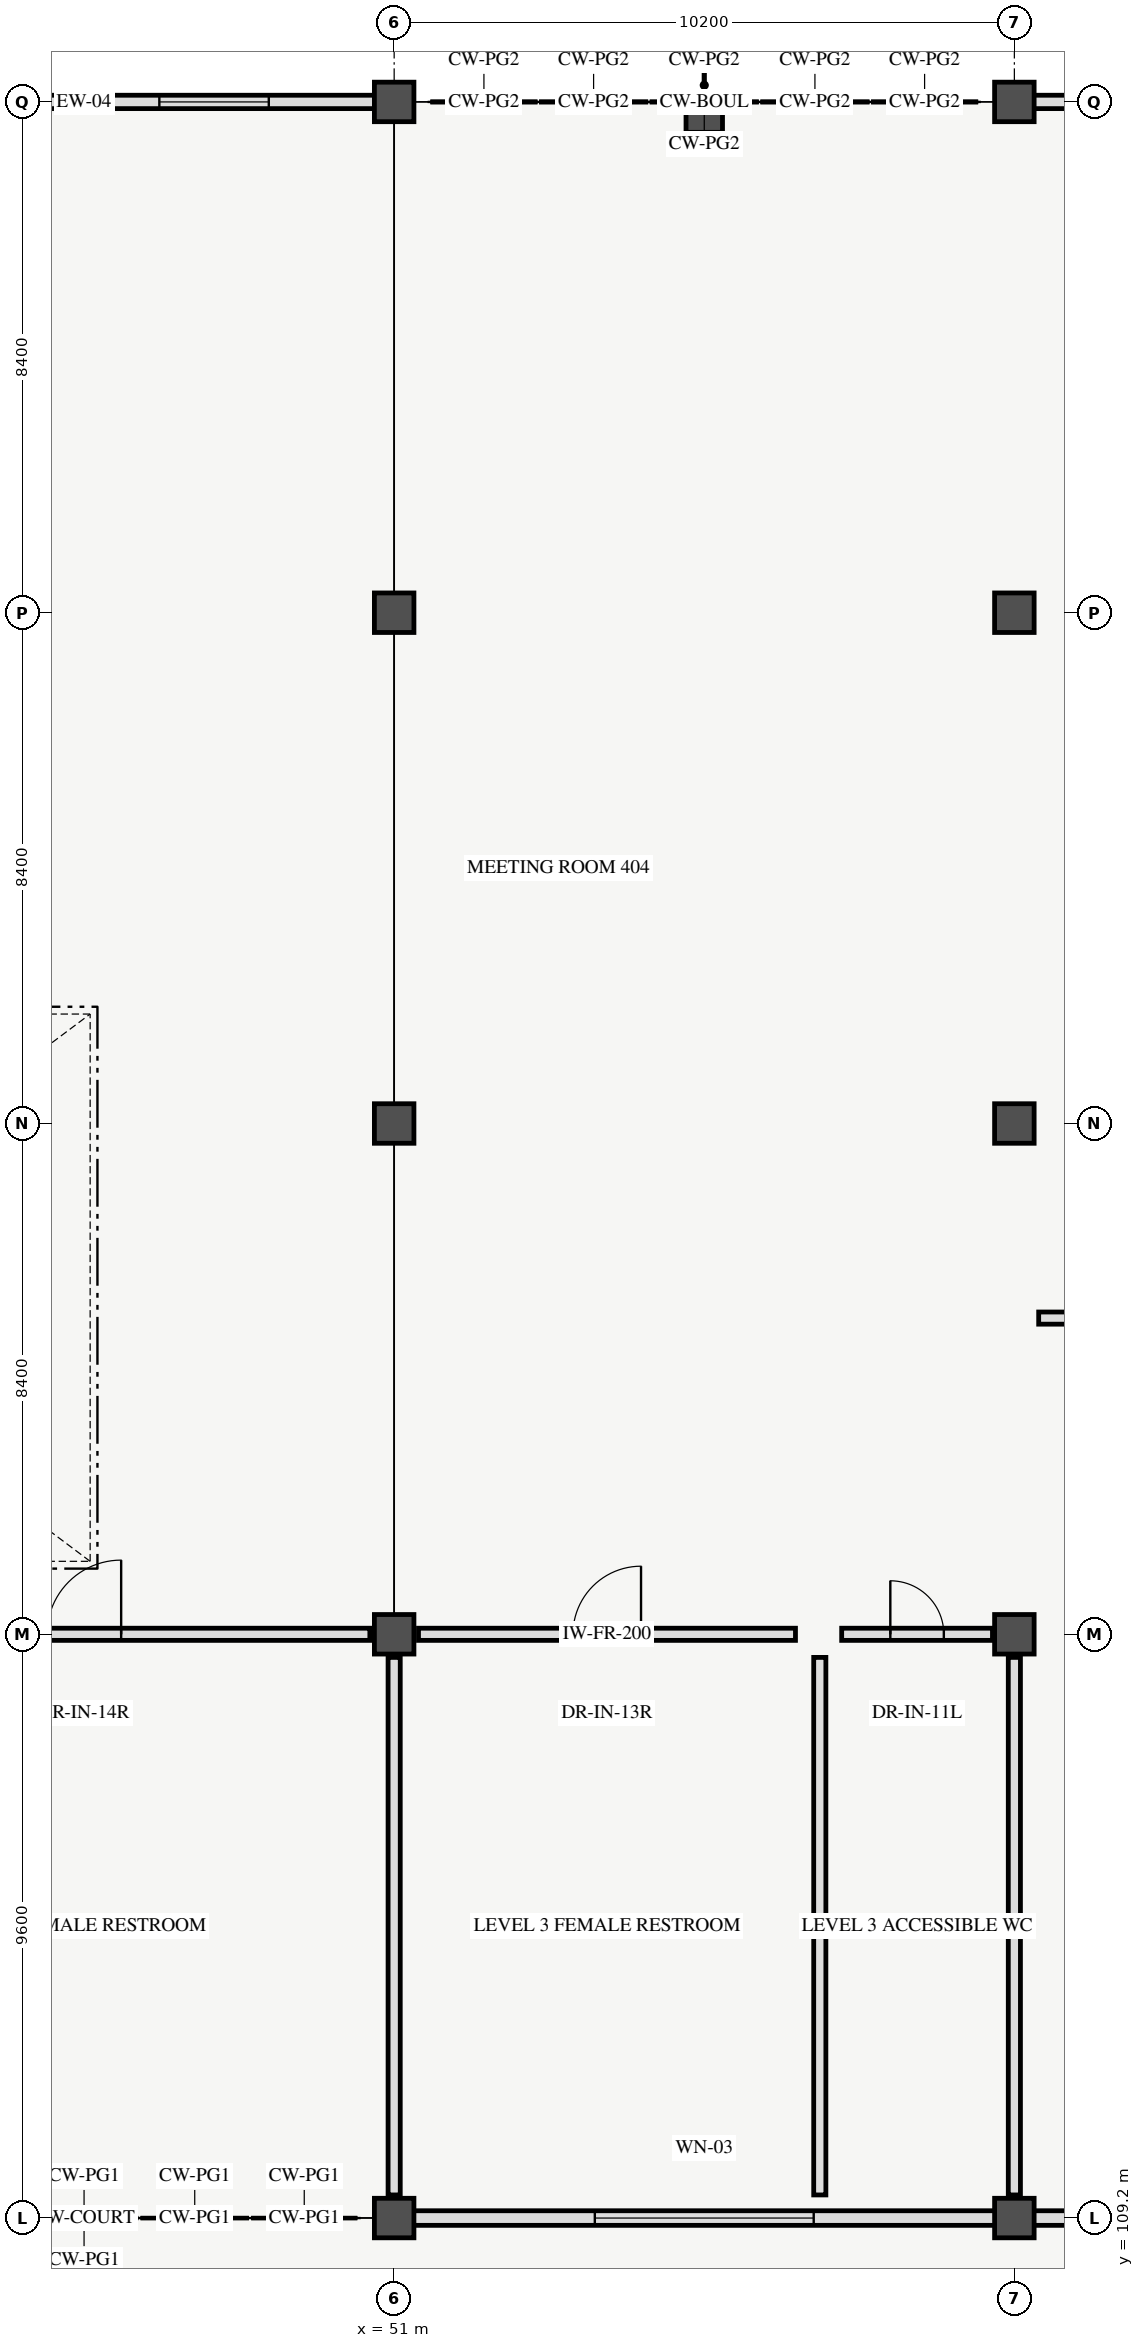
"""IFC4 building model, lengths in metres.
Left out: names, types, materials, properties, quantities, classifications, styles, units other than length and angle.
Written with IfcOpenShell. Run it as: python <this file> out.ifc"""

import sys

from ifc_helpers import new_model, si_unit, direction, frame, frame_2d, origin, origin_2d, place, context, subcontext, project, spatial, rectangle, extrude, element, fill, save


model = new_model("IFC4")
c1 = context("Model", 3, precision=1e-05, world=origin(), true_north=direction((0.0, 1.0)))
c2 = subcontext(c1, "Body", "Model", "MODEL_VIEW")
j1 = project(units=[si_unit("LENGTHUNIT", "METRE"), si_unit("PLANEANGLEUNIT", "RADIAN")], contexts=[c1])
p1 = place(None, origin())
s1 = spatial("IfcSite", under=j1, at=p1, CompositionType="ELEMENT")
p2 = place(p1, origin())
s2 = spatial("IfcBuilding", under=s1, at=p2, CompositionType="ELEMENT")
p3 = place(p2, frame((0.0, 0.0, 15.0)))
s3 = spatial("IfcBuildingStorey", under=s2, at=p3, CompositionType="ELEMENT", Elevation=15.0)
for number, where, z_axis, x_axis in (
    (1, (51.0, 109.2, 0.0), (0.0, 0.0, 1.0), (1.0, 0.0, 0.0)),
    (2, (51.0, 118.8, 0.0), (0.0, 0.0, 1.0), (1.0, 0.0, 0.0)),
    (3, (51.0, 127.2, 0.0), (0.0, 0.0, 1.0), (1.0, 0.0, 0.0)),
    (4, (51.0, 135.6, 0.0), (0.0, 0.0, 1.0), (1.0, 0.0, 0.0)),
    (5, (51.0, 144.0, 0.0), (0.0, 0.0, 1.0), (1.0, 0.0, 0.0)),
    (6, (61.2, 109.2, 0.0), (0.0, 0.0, 1.0), (1.0, 0.0, 0.0)),
    (7, (61.2, 118.8, 0.0), (0.0, 0.0, 1.0), (1.0, 0.0, 0.0)),
    (8, (61.2, 127.2, 0.0), (0.0, 0.0, 1.0), (1.0, 0.0, 0.0)),
    (9, (61.2, 135.6, 0.0), (0.0, 0.0, 1.0), (1.0, 0.0, 0.0)),
    (10, (61.2, 144.0, 0.0), (0.0, 0.0, 1.0), (1.0, 0.0, 0.0)),
):
    element("IfcColumn", number, at=place(p3, frame(where, z_axis=z_axis, x_axis=x_axis)), inside=s3, PredefinedType="COLUMN", context=c2, shape_type="SweptSolid", body=[
        extrude(rectangle(XDim=0.65, YDim=0.65, at=origin_2d()), origin(), (0.0, 0.0, 1.0), 4.2),
    ])
p4 = place(p3, frame((56.1, 143.7, 0.0), z_axis=(0.0, 0.0, 1.0), x_axis=(1.0, 0.0, 0.0)))
e11 = element("IfcColumn", 11, at=p4, inside=s3, PredefinedType="PILASTER", context=c2, shape_type="SweptSolid", body=[
    extrude(rectangle(XDim=0.6, YDim=0.4, at=origin_2d()), origin(), (0.0, 0.0, 1.0), 4.2),
])
p5 = place(p3, frame((41.04, 144.0, 0.0), z_axis=(0.0, 0.0, 1.0), x_axis=(1.0, 0.0, 0.0)))
e12 = element("IfcWall", 12, at=p5, inside=s3, PredefinedType="STANDARD", context=c2, shape_type="SweptSolid", body=[
    extrude(rectangle(XDim=9.72, YDim=0.22, at=frame_2d((4.86, 0.0))), origin(), (0.0, 0.0, 1.0), 3.06),
])
p6 = place(p5, frame((1.91, 0.0, 0.7)))
e13 = element("IfcOpeningElement", 13, at=p6, cuts=e12, PredefinedType="OPENING", context=c2, shape_type="SweptSolid", body=[
    extrude(rectangle(XDim=2.4, YDim=2.1, at=frame_2d((1.2, 1.05))), frame((0.0, 0.12, 0.0), z_axis=(0.0, -1.0, 0.0), x_axis=(1.0, 0.0, 0.0)), (0.0, 0.0, 1.0), 0.24),
])
p7 = place(p5, frame((6.098, 0.0, 0.85)))
e14 = element("IfcOpeningElement", 14, at=p7, cuts=e12, PredefinedType="OPENING", context=c2, shape_type="SweptSolid", body=[
    extrude(rectangle(XDim=1.8, YDim=1.8, at=frame_2d((0.9, 0.9))), frame((0.0, 0.12, 0.0), z_axis=(0.0, -1.0, 0.0), x_axis=(1.0, 0.0, 0.0)), (0.0, 0.0, 1.0), 0.24),
])
p8 = place(p3, frame((51.24, 109.2, 0.0), z_axis=(0.0, 0.0, 1.0), x_axis=(1.0, 0.0, 0.0)))
e15 = element("IfcWall", 15, at=p8, inside=s3, PredefinedType="STANDARD", context=c2, shape_type="SweptSolid", body=[
    extrude(rectangle(XDim=9.72, YDim=0.24, at=frame_2d((4.86, 0.0))), origin(), (0.0, 0.0, 1.0), 3.06),
])
p9 = place(p8, frame((3.06, 0.0, 0.9)))
e16 = element("IfcOpeningElement", 16, at=p9, cuts=e15, PredefinedType="OPENING", context=c2, shape_type="SweptSolid", body=[
    extrude(rectangle(XDim=3.6, YDim=2.1, at=frame_2d((1.8, 1.05))), frame((0.0, 0.13, 0.0), z_axis=(0.0, -1.0, 0.0), x_axis=(1.0, 0.0, 0.0)), (0.0, 0.0, 1.0), 0.26),
])
p10 = place(p3, frame((61.44, 109.2, 0.0), z_axis=(0.0, 0.0, 1.0), x_axis=(1.0, 0.0, 0.0)))
e17 = element("IfcWall", 17, at=p10, inside=s3, PredefinedType="STANDARD", context=c2, shape_type="SweptSolid", body=[
    extrude(rectangle(XDim=9.72, YDim=0.24, at=frame_2d((4.86, 0.0))), origin(), (0.0, 0.0, 1.0), 3.06),
])
p11 = place(p10, frame((3.81, 0.0, 0.0)))
e18 = element("IfcOpeningElement", 18, at=p11, cuts=e17, PredefinedType="OPENING", context=c2, shape_type="SweptSolid", body=[
    extrude(rectangle(XDim=2.1, YDim=2.3, at=frame_2d((1.05, 1.15))), frame((0.0, 0.13, 0.0), z_axis=(0.0, -1.0, 0.0), x_axis=(1.0, 0.0, 0.0)), (0.0, 0.0, 1.0), 0.26),
])
p12 = place(p3, frame((61.44, 144.0, 0.0), z_axis=(0.0, 0.0, 1.0), x_axis=(1.0, 0.0, 0.0)))
e19 = element("IfcWall", 19, at=p12, inside=s3, PredefinedType="STANDARD", context=c2, shape_type="SweptSolid", body=[
    extrude(rectangle(XDim=9.72, YDim=0.22, at=frame_2d((4.86, 0.0))), origin(), (0.0, 0.0, 1.0), 3.06),
])
p13 = place(p12, frame((1.91, 0.0, 0.7)))
e20 = element("IfcOpeningElement", 20, at=p13, cuts=e19, PredefinedType="OPENING", context=c2, shape_type="SweptSolid", body=[
    extrude(rectangle(XDim=2.4, YDim=2.1, at=frame_2d((1.2, 1.05))), frame((0.0, 0.12, 0.0), z_axis=(0.0, -1.0, 0.0), x_axis=(1.0, 0.0, 0.0)), (0.0, 0.0, 1.0), 0.24),
])
p14 = place(p12, frame((6.098, 0.0, 0.85)))
e21 = element("IfcOpeningElement", 21, at=p14, cuts=e19, PredefinedType="OPENING", context=c2, shape_type="SweptSolid", body=[
    extrude(rectangle(XDim=1.8, YDim=1.8, at=frame_2d((0.9, 0.9))), frame((0.0, 0.12, 0.0), z_axis=(0.0, -1.0, 0.0), x_axis=(1.0, 0.0, 0.0)), (0.0, 0.0, 1.0), 0.24),
])
p15 = place(p3, frame((51.4, 118.8, 0.0), z_axis=(0.0, 0.0, 1.0), x_axis=(1.0, 0.0, 0.0)))
e22 = element("IfcWall", 22, at=p15, inside=s3, PredefinedType="PARTITIONING", context=c2, shape_type="SweptSolid", body=[
    extrude(rectangle(XDim=6.2, YDim=0.2, at=frame_2d((3.1, 0.0))), origin(), (0.0, 0.0, 1.0), 3.06),
])
p16 = place(p15, frame((2.54, 0.0, 0.0)))
e23 = element("IfcOpeningElement", 23, at=p16, cuts=e22, PredefinedType="OPENING", context=c2, shape_type="SweptSolid", body=[
    extrude(rectangle(XDim=1.12, YDim=2.18, at=frame_2d((0.56, 1.09))), frame((0.0, 0.11, 0.0), z_axis=(0.0, -1.0, 0.0), x_axis=(1.0, 0.0, 0.0)), (0.0, 0.0, 1.0), 0.22),
])
p17 = place(p3, frame((61.6, 124.0, 0.0), z_axis=(0.0, 0.0, 1.0), x_axis=(1.0, 0.0, 0.0)))
e24 = element("IfcWall", 24, at=p17, inside=s3, PredefinedType="PARTITIONING", context=c2, shape_type="SweptSolid", body=[
    extrude(rectangle(XDim=9.4, YDim=0.2, at=frame_2d((4.7, 0.0))), origin(), (0.0, 0.0, 1.0), 3.06),
])
p18 = place(p17, frame((4.11, 0.0, 0.0)))
e25 = element("IfcOpeningElement", 25, at=p18, cuts=e24, PredefinedType="OPENING", context=c2, shape_type="SweptSolid", body=[
    extrude(rectangle(XDim=1.18, YDim=2.22, at=frame_2d((0.59, 1.11))), frame((0.0, 0.11, 0.0), z_axis=(0.0, -1.0, 0.0), x_axis=(1.0, 0.0, 0.0)), (0.0, 0.0, 1.0), 0.22),
])
p19 = place(p3, frame((41.2, 118.8, 0.0), z_axis=(0.0, 0.0, 1.0), x_axis=(1.0, 0.0, 0.0)))
e26 = element("IfcWall", 26, at=p19, inside=s3, PredefinedType="PARTITIONING", context=c2, shape_type="SweptSolid", body=[
    extrude(rectangle(XDim=9.4, YDim=0.2, at=frame_2d((4.7, 0.0))), origin(), (0.0, 0.0, 1.0), 3.06),
])
p20 = place(p19, frame((4.09, 0.0, 0.0)))
e27 = element("IfcOpeningElement", 27, at=p20, cuts=e26, PredefinedType="OPENING", context=c2, shape_type="SweptSolid", body=[
    extrude(rectangle(XDim=1.22, YDim=2.22, at=frame_2d((0.61, 1.11))), frame((0.0, 0.11, 0.0), z_axis=(0.0, -1.0, 0.0), x_axis=(1.0, 0.0, 0.0)), (0.0, 0.0, 1.0), 0.22),
])
p21 = place(p3, frame((58.36, 118.8, 0.0), z_axis=(0.0, 0.0, 1.0), x_axis=(1.0, 0.0, 0.0)))
e28 = element("IfcWall", 28, at=p21, inside=s3, PredefinedType="PARTITIONING", context=c2, shape_type="SweptSolid", body=[
    extrude(rectangle(XDim=2.48, YDim=0.2, at=frame_2d((1.24, 0.0))), origin(), (0.0, 0.0, 1.0), 3.06),
])
p22 = place(p21, frame((0.8, 0.0, 0.0)))
e29 = element("IfcOpeningElement", 29, at=p22, cuts=e28, PredefinedType="OPENING", context=c2, shape_type="SweptSolid", body=[
    extrude(rectangle(XDim=0.88, YDim=2.08, at=frame_2d((0.44, 1.04))), frame((0.0, 0.11, 0.0), z_axis=(0.0, -1.0, 0.0), x_axis=(1.0, 0.0, 0.0)), (0.0, 0.0, 1.0), 0.22),
])
for number, where, z_axis, x_axis in (
    (30, (51.0, 109.58, 0.0), (0.0, 0.0, 1.0), (0.0, 1.0, 0.0)),
    (31, (58.0, 109.58, 0.0), (0.0, 0.0, 1.0), (0.0, 1.0, 0.0)),
    (32, (61.2, 109.58, 0.0), (0.0, 0.0, 1.0), (0.0, 1.0, 0.0)),
):
    element("IfcWall", number, at=place(p3, frame(where, z_axis=z_axis, x_axis=x_axis)), inside=s3, PredefinedType="PARTITIONING", context=c2, shape_type="SweptSolid", body=[
        extrude(rectangle(XDim=8.84, YDim=0.2, at=frame_2d((4.42, 0.0))), origin(), (0.0, 0.0, 1.0), 3.06),
    ])
p23 = place(p7, origin())
e33 = element("IfcWindow", 33, at=p23, inside=s3, PartitioningType="DOUBLE_PANEL_VERTICAL", PredefinedType="WINDOW", context=c2, shape_type="SweptSolid", body=[
    extrude(rectangle(XDim=1.8, YDim=1.8, at=frame_2d((0.9, 0.9))), frame((0.0, 0.03, 0.0), z_axis=(0.0, -1.0, 0.0), x_axis=(1.0, 0.0, 0.0)), (0.0, 0.0, 1.0), 0.06),
])
fill(e14, e33)
p24 = place(p9, origin())
e34 = element("IfcWindow", 34, at=p24, inside=s3, PartitioningType="TRIPLE_PANEL_VERTICAL", PredefinedType="WINDOW", context=c2, shape_type="SweptSolid", body=[
    extrude(rectangle(XDim=3.6, YDim=2.1, at=frame_2d((1.8, 1.05))), frame((0.0, 0.03, 0.0), z_axis=(0.0, -1.0, 0.0), x_axis=(1.0, 0.0, 0.0)), (0.0, 0.0, 1.0), 0.06),
])
fill(e16, e34)
p25 = place(p16, origin())
e35 = element("IfcDoor", 35, at=p25, inside=s3, OperationType="SINGLE_SWING_RIGHT", PredefinedType="DOOR", context=c2, shape_type="SweptSolid", body=[
    extrude(rectangle(XDim=1.12, YDim=2.18, at=frame_2d((0.56, 1.09))), frame((0.0, 0.025, 0.0), z_axis=(0.0, -1.0, 0.0), x_axis=(1.0, 0.0, 0.0)), (0.0, 0.0, 1.0), 0.05),
])
fill(e23, e35)
p26 = place(p20, origin())
e36 = element("IfcDoor", 36, at=p26, inside=s3, OperationType="SINGLE_SWING_RIGHT", PredefinedType="DOOR", context=c2, shape_type="SweptSolid", body=[
    extrude(rectangle(XDim=1.22, YDim=2.22, at=frame_2d((0.61, 1.11))), frame((0.0, 0.025, 0.0), z_axis=(0.0, -1.0, 0.0), x_axis=(1.0, 0.0, 0.0)), (0.0, 0.0, 1.0), 0.05),
])
fill(e27, e36)
p27 = place(p22, origin())
e37 = element("IfcDoor", 37, at=p27, inside=s3, OperationType="SINGLE_SWING_LEFT", PredefinedType="DOOR", context=c2, shape_type="SweptSolid", body=[
    extrude(rectangle(XDim=0.88, YDim=2.08, at=frame_2d((0.44, 1.04))), frame((0.0, 0.025, 0.0), z_axis=(0.0, -1.0, 0.0), x_axis=(1.0, 0.0, 0.0)), (0.0, 0.0, 1.0), 0.05),
])
fill(e29, e37)
save(model, sys.argv[1])
